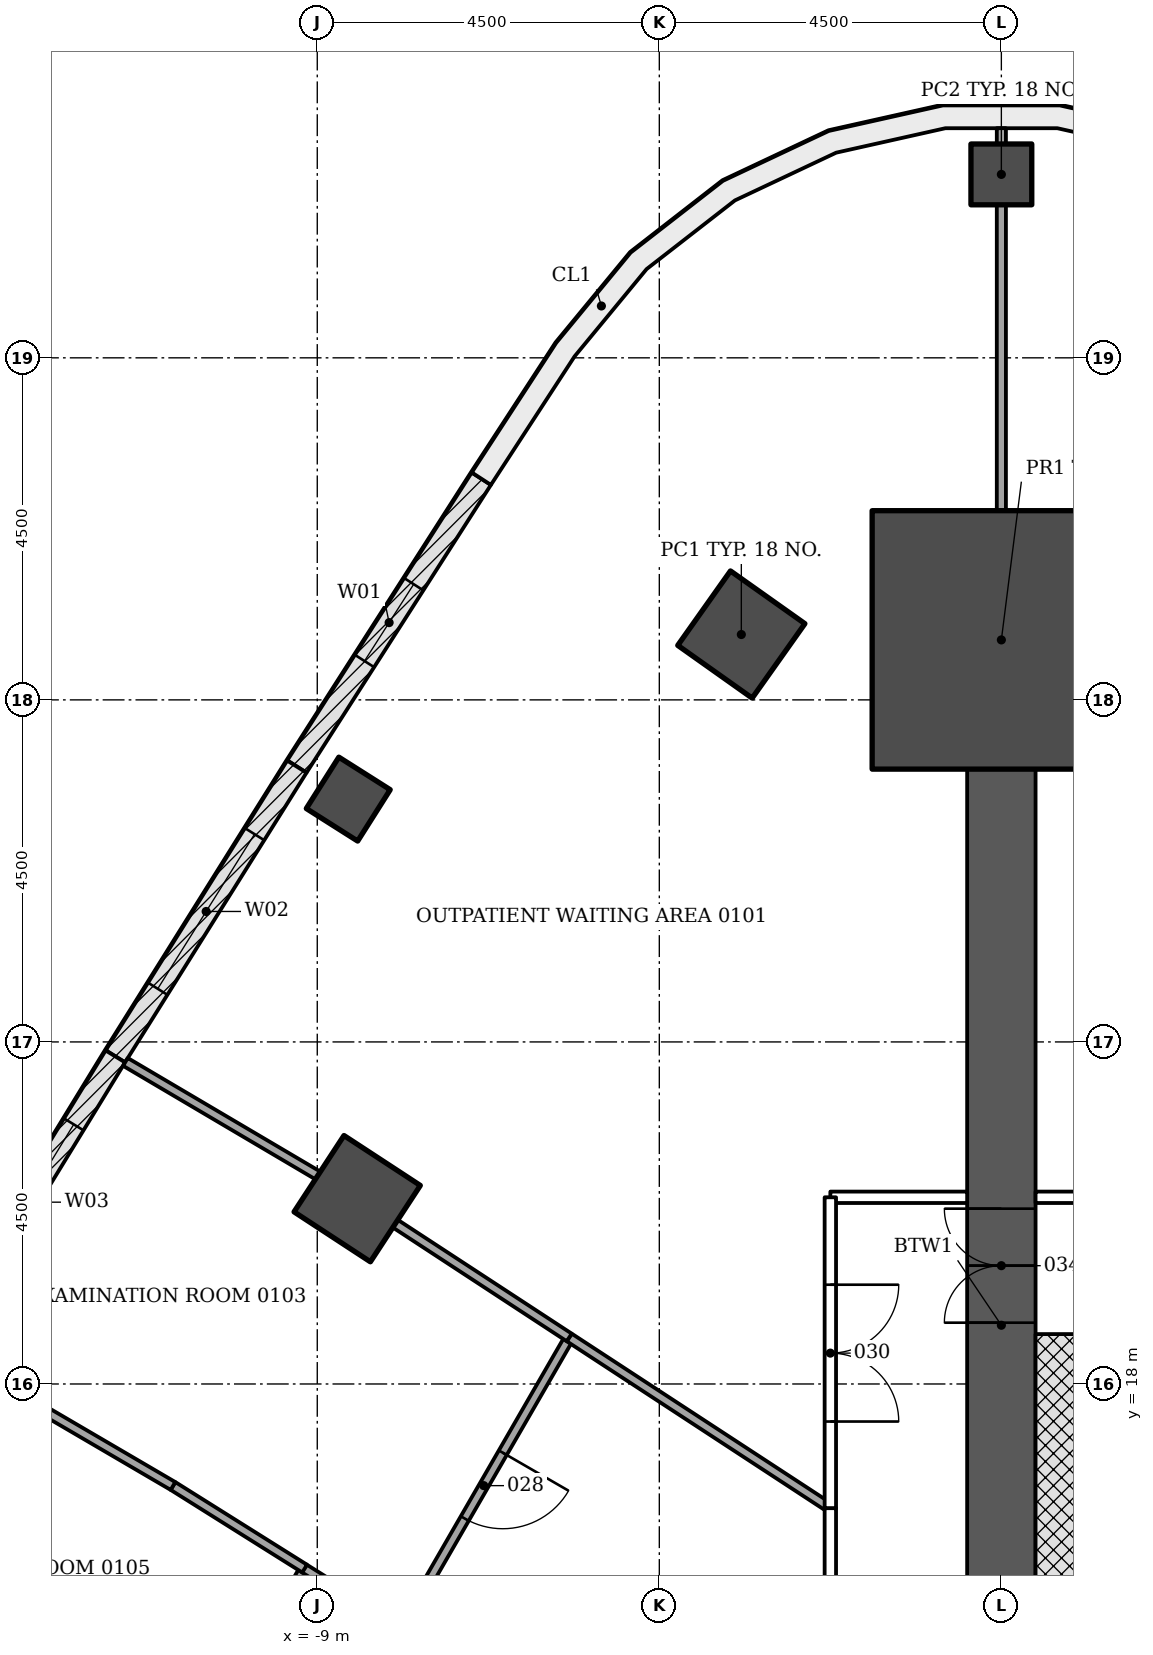
"""IFC4 building model, lengths in metres.
Left out: names, types, materials, properties, quantities, classifications, styles, units other than length and angle.
Written with IfcOpenShell. Run it as: python <this file> out.ifc"""

import sys

from ifc_helpers import new_model, si_unit, direction, frame, frame_2d, origin, origin_2d, place, context, subcontext, project, spatial, polyline, rectangle, outline, extrude, element, fill, save


model = new_model("IFC4")
c1 = context("Model", 3, precision=1e-05, world=origin(), true_north=direction((0.0, 1.0)))
c2 = subcontext(c1, "Body", "Model", "MODEL_VIEW")
j1 = project(units=[si_unit("LENGTHUNIT", "METRE"), si_unit("PLANEANGLEUNIT", "RADIAN")], contexts=[c1])
p1 = place(None, origin())
s1 = spatial("IfcSite", under=j1, at=p1, CompositionType="ELEMENT")
p2 = place(p1, origin())
s2 = spatial("IfcBuilding", under=s1, at=p2, CompositionType="ELEMENT")
p3 = place(p2, frame((0.0, 0.0, 6.0)))
s3 = spatial("IfcBuildingStorey", under=s2, at=p3, CompositionType="ELEMENT", Elevation=6.0)
for number, where, z_axis, x_axis in (
    (1, (-3.421, 27.86, -0.25), (0.0, 0.0, 1.0), (-0.816, 0.578, 0.0)),
    (2, (-8.475, 20.438, -0.25), (0.0, 0.0, 1.0), (-0.837, 0.547, 0.0)),
):
    element("IfcColumn", number, at=place(p3, frame(where, z_axis=z_axis, x_axis=x_axis)), inside=s3, PredefinedType="COLUMN", context=c2, shape_type="SweptSolid", body=[
        extrude(rectangle(XDim=1.2, YDim=1.2, at=origin_2d()), origin(), (0.0, 0.0, 1.0), 4.5),
    ])
for number, where, z_axis, x_axis in (
    (3, (0.0, 33.913, -0.25), (0.0, 0.0, 1.0), (0.0, 1.0, 0.0)),
    (4, (-8.592, 25.695, -0.25), (0.0, 0.0, 1.0), (-0.845, 0.535, 0.0)),
):
    element("IfcColumn", number, at=place(p3, frame(where, z_axis=z_axis, x_axis=x_axis)), inside=s3, PredefinedType="COLUMN", context=c2, shape_type="SweptSolid", body=[
        extrude(rectangle(XDim=0.8, YDim=0.8, at=origin_2d()), origin(), (0.0, 0.0, 1.0), 4.5),
    ])
p4 = place(p3, frame((0.0, 11.456, -0.25), z_axis=(0.0, 0.0, 1.0), x_axis=(0.0, 1.0, 0.0)))
e5 = element("IfcWall", 5, at=p4, inside=s3, PredefinedType="SHEAR", context=c2, shape_type="SweptSolid", body=[
    extrude(rectangle(XDim=14.633, YDim=0.9, at=frame_2d((7.316, 0.0))), origin(), (0.0, 0.0, 1.0), 4.5),
])
p5 = place(p4, frame((7.35, 0.0, 0.25)))
e6 = element("IfcOpeningElement", 6, at=p5, cuts=e5, PredefinedType="OPENING", context=c2, shape_type="SweptSolid", body=[
    extrude(rectangle(XDim=1.5, YDim=2.1, at=frame_2d((0.75, 1.05))), frame((0.0, 0.46, 0.0), z_axis=(0.0, -1.0, 0.0), x_axis=(1.0, 0.0, 0.0)), (0.0, 0.0, 1.0), 0.92),
])
p6 = place(p3, frame((0.0, 27.789, -0.25), z_axis=(0.0, 0.0, 1.0), x_axis=(0.0, 1.0, 0.0)))
e7 = element("IfcColumn", 7, at=p6, inside=s3, PredefinedType="COLUMN", context=c2, shape_type="SweptSolid", body=[
    extrude(rectangle(XDim=3.4, YDim=3.4, at=origin_2d()), origin(), (0.0, 0.0, 1.0), 4.5),
])
p7 = place(p3, frame((-9.268, 26.124, 0.0), z_axis=(0.0, 0.0, 1.0), x_axis=(0.539483537275, 0.841996147859, 0.0)))
e8 = element("IfcWall", 8, at=p7, inside=s3, PredefinedType="NOTDEFINED", context=c2, shape_type="SweptSolid", body=[
    extrude(rectangle(XDim=4.496, YDim=0.3, at=frame_2d((2.248, 0.0))), origin(), (0.0, 0.0, 1.0), 4.25),
])
p8 = place(p7, frame((1.648, 0.0, 0.8)))
e9 = element("IfcOpeningElement", 9, at=p8, cuts=e8, PredefinedType="OPENING", context=c2, shape_type="SweptSolid", body=[
    extrude(rectangle(XDim=1.2, YDim=3.0, at=frame_2d((0.6, 1.5))), frame((0.0, 0.16, 0.0), z_axis=(0.0, -1.0, 0.0), x_axis=(1.0, 0.0, 0.0)), (0.0, 0.0, 1.0), 0.32),
])
p9 = place(p3, frame((-11.655, 22.311, 0.0), z_axis=(0.0, 0.0, 1.0), x_axis=(0.530804082031, 0.847494558389, 0.0)))
e10 = element("IfcWall", 10, at=p9, inside=s3, PredefinedType="NOTDEFINED", context=c2, shape_type="SweptSolid", body=[
    extrude(rectangle(XDim=4.496, YDim=0.3, at=frame_2d((2.248, 0.0))), origin(), (0.0, 0.0, 1.0), 4.25),
])
p10 = place(p9, frame((1.048, 0.0, 0.9)))
e11 = element("IfcOpeningElement", 11, at=p10, cuts=e10, PredefinedType="OPENING", context=c2, shape_type="SweptSolid", body=[
    extrude(rectangle(XDim=2.4, YDim=2.4, at=frame_2d((1.2, 1.2))), frame((0.0, 0.16, 0.0), z_axis=(0.0, -1.0, 0.0), x_axis=(1.0, 0.0, 0.0)), (0.0, 0.0, 1.0), 0.32),
])
p11 = place(p3, frame((-14.004, 18.475, 0.0), z_axis=(0.0, 0.0, 1.0), x_axis=(0.522078085402, 0.852897691838, 0.0)))
e12 = element("IfcWall", 12, at=p11, inside=s3, PredefinedType="NOTDEFINED", context=c2, shape_type="SweptSolid", body=[
    extrude(rectangle(XDim=4.496, YDim=0.3, at=frame_2d((2.248, 0.0))), origin(), (0.0, 0.0, 1.0), 4.25),
])
p12 = place(p11, frame((1.048, 0.0, 0.9)))
e13 = element("IfcOpeningElement", 13, at=p12, cuts=e12, PredefinedType="OPENING", context=c2, shape_type="SweptSolid", body=[
    extrude(rectangle(XDim=2.4, YDim=2.4, at=frame_2d((1.2, 1.2))), frame((0.0, 0.16, 0.0), z_axis=(0.0, -1.0, 0.0), x_axis=(1.0, 0.0, 0.0)), (0.0, 0.0, 1.0), 0.32),
])
p13 = place(p3, origin())
e14 = element("IfcWall", 14, at=p13, inside=s3, PredefinedType="NOTDEFINED", context=c2, shape_type="SweptSolid", body=[
    extrude(outline(polyline([(6.967, 29.992), (5.857, 31.697), (4.878, 32.884), (3.663, 33.828), (2.271, 34.485), (0.769, 34.821), (-0.769, 34.821), (-2.271, 34.485), (-3.663, 33.828), (-4.878, 32.884), (-5.857, 31.697), (-6.967, 29.992), (-6.716, 29.828), (-5.615, 31.519), (-4.667, 32.667), (-3.505, 33.571), (-2.173, 34.199), (-0.736, 34.521), (0.736, 34.521), (2.173, 34.199), (3.505, 33.571), (4.667, 32.667), (5.615, 31.519), (6.716, 29.828), (6.967, 29.992)])), origin(), (0.0, 0.0, 1.0), 4.25),
])
p14 = place(p3, frame((1.018, 11.456, -0.25), z_axis=(0.0, 0.0, 1.0), x_axis=(0.0, 1.0, 0.0)))
e15 = element("IfcWall", 15, at=p14, inside=s3, PredefinedType="SHEAR", context=c2, shape_type="SweptSolid", body=[
    extrude(rectangle(XDim=7.2, YDim=1.136, at=frame_2d((3.6, 0.0))), origin(), (0.0, 0.0, 1.0), 4.5),
])
p15 = place(p3, frame((7.136, 20.456, 0.0), z_axis=(0.0, 0.0, 1.0), x_axis=(-1.0, 0.0, 0.0)))
e16 = element("IfcWall", 16, at=p15, inside=s3, PredefinedType="PARTITIONING", context=c2, shape_type="SweptSolid", body=[
    extrude(rectangle(XDim=6.686, YDim=0.15, at=frame_2d((3.343, 0.0))), origin(), (0.0, 0.0, 1.0), 3.638),
])
p16 = place(p15, frame((2.45, 0.0, 0.0)))
e17 = element("IfcOpeningElement", 17, at=p16, cuts=e16, PredefinedType="OPENING", context=c2, shape_type="SweptSolid", body=[
    extrude(rectangle(XDim=1.8, YDim=2.1, at=frame_2d((0.9, 1.05))), frame((0.0, 0.085, 0.0), z_axis=(0.0, -1.0, 0.0), x_axis=(1.0, 0.0, 0.0)), (0.0, 0.0, 1.0), 0.17),
])
p17 = place(p3, frame((-9.17, 15.572, 0.0), z_axis=(0.0, 0.0, 1.0), x_axis=(-0.499902881486, -0.866081467924, 0.0)))
e18 = element("IfcWall", 18, at=p17, inside=s3, PredefinedType="PARTITIONING", context=c2, shape_type="SweptSolid", body=[
    extrude(rectangle(XDim=4.451, YDim=0.12, at=frame_2d((2.226, 0.0))), origin(), (0.0, 0.0, 1.0), 3.638),
])
p18 = place(p17, frame((1.75, 0.0, 0.0)))
e19 = element("IfcOpeningElement", 19, at=p18, cuts=e18, PredefinedType="OPENING", context=c2, shape_type="SweptSolid", body=[
    extrude(rectangle(XDim=1.0, YDim=2.1, at=frame_2d((0.5, 1.05))), frame((0.0, 0.07, 0.0), z_axis=(0.0, -1.0, 0.0), x_axis=(1.0, 0.0, 0.0)), (0.0, 0.0, 1.0), 0.14),
])
p19 = place(p3, frame((-7.901, 14.776, 0.0), z_axis=(0.0, 0.0, 1.0), x_axis=(-0.847002237732, 0.531589323892, 0.0)))
e20 = element("IfcWall", 20, at=p19, inside=s3, PredefinedType="PARTITIONING", context=c2, shape_type="SweptSolid", body=[
    extrude(rectangle(XDim=1.503, YDim=0.12, at=frame_2d((0.751, 0.0))), origin(), (0.0, 0.0, 1.0), 3.638),
])
p20 = place(p3, frame((-2.25, 16.366, 0.0), z_axis=(0.0, 0.0, 1.0), x_axis=(0.0, -1.0, 0.0)))
e21 = element("IfcWall", 21, at=p20, inside=s3, PredefinedType="PARTITIONING", context=c2, shape_type="SweptSolid", body=[
    extrude(rectangle(XDim=1.41, YDim=0.15, at=frame_2d((0.705, 0.0))), origin(), (0.0, 0.0, 1.0), 3.638),
])
p21 = place(p3, frame((-0.45, 20.456, 0.0), z_axis=(0.0, 0.0, 1.0), x_axis=(-1.0, 0.0, 0.0)))
e22 = element("IfcWall", 22, at=p21, inside=s3, PredefinedType="PARTITIONING", context=c2, shape_type="SweptSolid", body=[
    extrude(rectangle(XDim=1.8, YDim=0.15, at=frame_2d((0.9, 0.0))), origin(), (0.0, 0.0, 1.0), 3.638),
])
p22 = place(p3, frame((-2.25, 20.456, 0.0), z_axis=(0.0, 0.0, 1.0), x_axis=(0.0, -1.0, 0.0)))
e23 = element("IfcWall", 23, at=p22, inside=s3, PredefinedType="PARTITIONING", context=c2, shape_type="SweptSolid", body=[
    extrude(rectangle(XDim=4.089, YDim=0.15, at=frame_2d((2.044, 0.0))), origin(), (0.0, 0.0, 1.0), 3.638),
])
p23 = place(p22, frame((1.15, 0.0, 0.0)))
e24 = element("IfcOpeningElement", 24, at=p23, cuts=e23, PredefinedType="OPENING", context=c2, shape_type="SweptSolid", body=[
    extrude(rectangle(XDim=1.8, YDim=2.1, at=frame_2d((0.9, 1.05))), frame((0.0, 0.085, 0.0), z_axis=(0.0, -1.0, 0.0), x_axis=(1.0, 0.0, 0.0)), (0.0, 0.0, 1.0), 0.17),
])
p24 = place(p3, frame((-9.166, 15.571, 0.0), z_axis=(0.0, 0.0, 1.0), x_axis=(-0.84701751501, 0.531564981227, 0.0)))
e25 = element("IfcWall", 25, at=p24, inside=s3, PredefinedType="PARTITIONING", context=c2, shape_type="SweptSolid", body=[
    extrude(rectangle(XDim=2.045, YDim=0.12, at=frame_2d((1.022, 0.0))), origin(), (0.0, 0.0, 1.0), 3.638),
])
p25 = place(p3, frame((-10.898, 16.658, 0.0), z_axis=(0.0, 0.0, 1.0), x_axis=(-0.863161652457, 0.504927679701, 0.0)))
e26 = element("IfcWall", 26, at=p25, inside=s3, PredefinedType="PARTITIONING", context=c2, shape_type="SweptSolid", body=[
    extrude(rectangle(XDim=2.398, YDim=0.12, at=frame_2d((1.199, 0.0))), origin(), (0.0, 0.0, 1.0), 3.638),
])
p26 = place(p3, frame((-5.684, 18.611, 0.0), z_axis=(0.0, 0.0, 1.0), x_axis=(-0.500099413844, -0.865967999567, 0.0)))
e27 = element("IfcWall", 27, at=p26, inside=s3, PredefinedType="PARTITIONING", context=c2, shape_type="SweptSolid", body=[
    extrude(rectangle(XDim=4.429, YDim=0.12, at=frame_2d((2.214, 0.0))), origin(), (0.0, 0.0, 1.0), 3.638),
])
p27 = place(p26, frame((1.75, 0.0, 0.0)))
e28 = element("IfcOpeningElement", 28, at=p27, cuts=e27, PredefinedType="OPENING", context=c2, shape_type="SweptSolid", body=[
    extrude(rectangle(XDim=1.0, YDim=2.1, at=frame_2d((0.5, 1.05))), frame((0.0, 0.07, 0.0), z_axis=(0.0, -1.0, 0.0), x_axis=(1.0, 0.0, 0.0)), (0.0, 0.0, 1.0), 0.14),
])
p28 = place(p3, frame((-2.252, 16.367, 0.0), z_axis=(0.0, 0.0, 1.0), x_axis=(-0.836925574982, 0.547316710819, 0.0)))
e29 = element("IfcWall", 29, at=p28, inside=s3, PredefinedType="PARTITIONING", context=c2, shape_type="SweptSolid", body=[
    extrude(rectangle(XDim=4.102, YDim=0.12, at=frame_2d((2.051, 0.0))), origin(), (0.0, 0.0, 1.0), 3.638),
])
p29 = place(p3, frame((-8.992, 20.743, 0.0), z_axis=(0.0, 0.0, 1.0), x_axis=(-0.861228913487, 0.508217235613, 0.0)))
e30 = element("IfcWall", 30, at=p29, inside=s3, PredefinedType="PARTITIONING", context=c2, shape_type="SweptSolid", body=[
    extrude(rectangle(XDim=2.94, YDim=0.12, at=frame_2d((1.47, 0.0))), origin(), (0.0, 0.0, 1.0), 3.633),
])
p30 = place(p3, frame((-5.685, 18.612, 0.0), z_axis=(0.0, 0.0, 1.0), x_axis=(-0.836813840242, 0.547487531163, 0.0)))
e31 = element("IfcWall", 31, at=p30, inside=s3, PredefinedType="PARTITIONING", context=c2, shape_type="SweptSolid", body=[
    extrude(rectangle(XDim=2.734, YDim=0.12, at=frame_2d((1.367, 0.0))), origin(), (0.0, 0.0, 1.0), 3.638),
])
p31 = place(p3, frame((0.0, 29.489, 0.0), z_axis=(0.0, 0.0, 1.0), x_axis=(0.0, 1.0, 0.0)))
e32 = element("IfcWall", 32, at=p31, inside=s3, PredefinedType="PARTITIONING", context=c2, shape_type="SweptSolid", body=[
    extrude(rectangle(XDim=4.024, YDim=0.12, at=frame_2d((2.012, 0.0))), origin(), (0.0, 0.0, 1.0), 3.717),
])
p32 = place(p3, frame((0.0, 34.313, 0.0), z_axis=(0.0, 0.0, 1.0), x_axis=(0.0, 1.0, 0.0)))
e33 = element("IfcWall", 33, at=p32, inside=s3, PredefinedType="PARTITIONING", context=c2, shape_type="SweptSolid", body=[
    extrude(rectangle(XDim=0.208, YDim=0.12, at=frame_2d((0.104, 0.0))), origin(), (0.0, 0.0, 1.0), 4.25),
])
p33 = place(p8, origin())
e34 = element("IfcWindow", 34, at=p33, inside=s3, PartitioningType="SINGLE_PANEL", PredefinedType="WINDOW", context=c2, shape_type="SweptSolid", body=[
    extrude(rectangle(XDim=1.2, YDim=3.0, at=frame_2d((0.6, 1.5))), frame((0.0, 0.03, 0.0), z_axis=(0.0, -1.0, 0.0), x_axis=(1.0, 0.0, 0.0)), (0.0, 0.0, 1.0), 0.06),
])
fill(e9, e34)
p34 = place(p10, origin())
e35 = element("IfcWindow", 35, at=p34, inside=s3, PartitioningType="DOUBLE_PANEL_VERTICAL", PredefinedType="WINDOW", context=c2, shape_type="SweptSolid", body=[
    extrude(rectangle(XDim=2.4, YDim=2.4, at=frame_2d((1.2, 1.2))), frame((0.0, 0.03, 0.0), z_axis=(0.0, -1.0, 0.0), x_axis=(1.0, 0.0, 0.0)), (0.0, 0.0, 1.0), 0.06),
])
fill(e11, e35)
p35 = place(p12, origin())
e36 = element("IfcWindow", 36, at=p35, inside=s3, PartitioningType="DOUBLE_PANEL_VERTICAL", PredefinedType="WINDOW", context=c2, shape_type="SweptSolid", body=[
    extrude(rectangle(XDim=2.4, YDim=2.4, at=frame_2d((1.2, 1.2))), frame((0.0, 0.03, 0.0), z_axis=(0.0, -1.0, 0.0), x_axis=(1.0, 0.0, 0.0)), (0.0, 0.0, 1.0), 0.06),
])
fill(e13, e36)
p36 = place(p27, origin())
e37 = element("IfcDoor", 37, at=p36, inside=s3, OperationType="SINGLE_SWING_LEFT", PredefinedType="DOOR", context=c2, shape_type="SweptSolid", body=[
    extrude(rectangle(XDim=1.0, YDim=2.1, at=frame_2d((0.5, 1.05))), frame((0.0, 0.025, 0.0), z_axis=(0.0, -1.0, 0.0), x_axis=(1.0, 0.0, 0.0)), (0.0, 0.0, 1.0), 0.05),
])
fill(e28, e37)
p37 = place(p23, origin())
e38 = element("IfcDoor", 38, at=p37, inside=s3, OperationType="DOUBLE_DOOR_SINGLE_SWING", PredefinedType="DOOR", context=c2, shape_type="SweptSolid", body=[
    extrude(rectangle(XDim=1.8, YDim=2.1, at=frame_2d((0.9, 1.05))), frame((0.0, 0.025, 0.0), z_axis=(0.0, -1.0, 0.0), x_axis=(1.0, 0.0, 0.0)), (0.0, 0.0, 1.0), 0.05),
])
fill(e24, e38)
p38 = place(p5, origin())
e39 = element("IfcDoor", 39, at=p38, inside=s3, OperationType="DOUBLE_DOOR_SINGLE_SWING", PredefinedType="DOOR", context=c2, shape_type="SweptSolid", body=[
    extrude(rectangle(XDim=1.5, YDim=2.1, at=frame_2d((0.75, 1.05))), frame((0.0, 0.025, 0.0), z_axis=(0.0, -1.0, 0.0), x_axis=(1.0, 0.0, 0.0)), (0.0, 0.0, 1.0), 0.05),
])
fill(e6, e39)
save(model, sys.argv[1])
